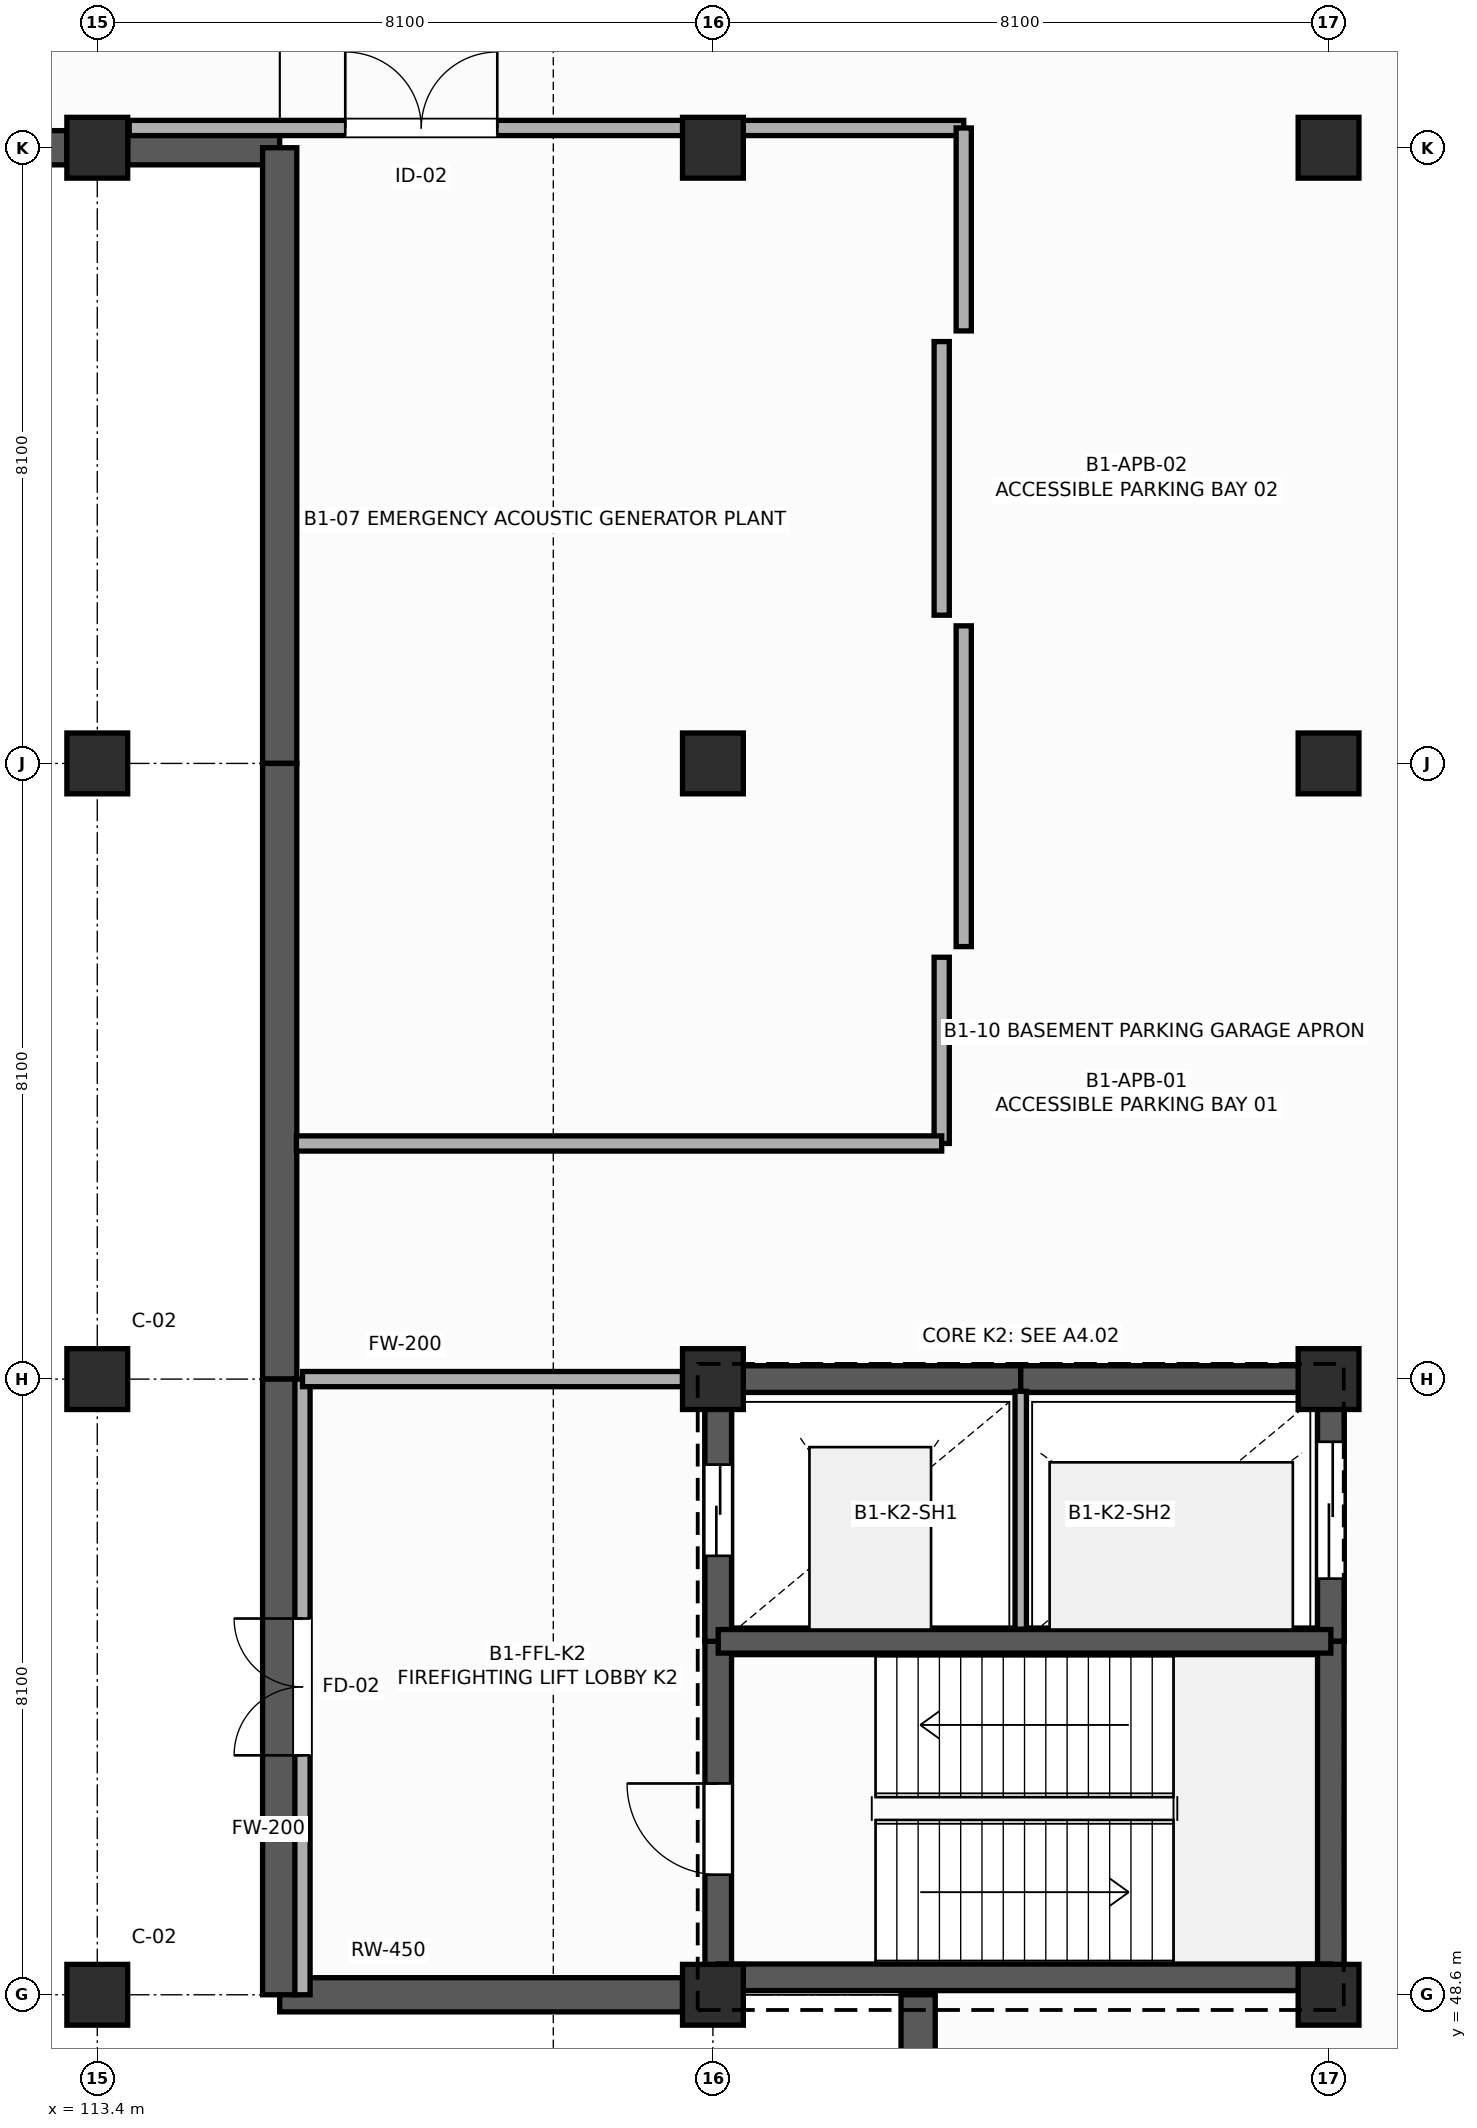
"""IFC4 building model, lengths in metres.
Left out: names, types, materials, properties, quantities, classifications, styles, units other than length and angle.
Written with IfcOpenShell. Run it as: python <this file> out.ifc"""

import sys

from ifc_helpers import new_model, si_unit, direction, frame, frame_2d, origin, origin_2d, place, context, subcontext, project, spatial, rectangle, extrude, element, fill, save


model = new_model("IFC4")
c1 = context("Model", 3, precision=1e-05, world=origin(), true_north=direction((0.0, 1.0)))
c2 = subcontext(c1, "Body", "Model", "MODEL_VIEW")
j1 = project(units=[si_unit("LENGTHUNIT", "METRE"), si_unit("PLANEANGLEUNIT", "RADIAN")], contexts=[c1])
p1 = place(None, origin())
s1 = spatial("IfcSite", under=j1, at=p1, CompositionType="ELEMENT")
p2 = place(p1, origin())
s2 = spatial("IfcBuilding", under=s1, at=p2, CompositionType="ELEMENT")
p3 = place(p2, frame((0.0, 0.0, -5.4)))
s3 = spatial("IfcBuildingStorey", under=s2, at=p3, CompositionType="ELEMENT", Elevation=-5.4)
for number, where, z_axis, x_axis in (
    (1, (113.4, 48.6, -0.4), (0.0, 0.0, 1.0), (1.0, 0.0, 0.0)),
    (2, (113.4, 56.7, -0.4), (0.0, 0.0, 1.0), (1.0, 0.0, 0.0)),
    (3, (113.4, 64.8, -0.4), (0.0, 0.0, 1.0), (1.0, 0.0, 0.0)),
    (4, (113.4, 72.9, -0.4), (0.0, 0.0, 1.0), (1.0, 0.0, 0.0)),
    (5, (121.5, 48.6, -0.4), (0.0, 0.0, 1.0), (1.0, 0.0, 0.0)),
    (6, (121.5, 56.7, -0.4), (0.0, 0.0, 1.0), (1.0, 0.0, 0.0)),
    (7, (121.5, 64.8, -0.4), (0.0, 0.0, 1.0), (1.0, 0.0, 0.0)),
    (8, (121.5, 72.9, -0.4), (0.0, 0.0, 1.0), (1.0, 0.0, 0.0)),
    (9, (129.6, 48.6, -0.4), (0.0, 0.0, 1.0), (1.0, 0.0, 0.0)),
    (10, (129.6, 56.7, -0.4), (0.0, 0.0, 1.0), (1.0, 0.0, 0.0)),
    (11, (129.6, 64.8, -0.4), (0.0, 0.0, 1.0), (1.0, 0.0, 0.0)),
    (12, (129.6, 72.9, -0.4), (0.0, 0.0, 1.0), (1.0, 0.0, 0.0)),
):
    element("IfcColumn", number, at=place(p3, frame(where, z_axis=z_axis, x_axis=x_axis)), inside=s3, PredefinedType="COLUMN", context=c2, shape_type="SweptSolid", body=[
        extrude(rectangle(XDim=0.8, YDim=0.8, at=origin_2d()), origin(), (0.0, 0.0, 1.0), 5.8),
    ])
p4 = place(p3, frame((115.8, 48.6, 0.0), z_axis=(0.0, 0.0, 1.0), x_axis=(1.0, 0.0, 0.0)))
e13 = element("IfcWall", 13, at=p4, inside=s3, PredefinedType="USERDEFINED", context=c2, shape_type="SweptSolid", body=[
    extrude(rectangle(XDim=5.3, YDim=0.45, at=frame_2d((2.65, 0.0))), origin(), (0.0, 0.0, 1.0), 5.1),
])
p5 = place(p3, frame((124.2, 48.6, 0.0), z_axis=(0.0, 0.0, 1.0), x_axis=(0.0, -1.0, 0.0)))
e14 = element("IfcWall", 14, at=p5, inside=s3, PredefinedType="USERDEFINED", context=c2, shape_type="SweptSolid", body=[
    extrude(rectangle(XDim=8.1, YDim=0.45, at=frame_2d((4.05, 0.0))), origin(), (0.0, 0.0, 1.0), 5.1),
])
p6 = place(p3, frame((105.7, 72.9, 0.0), z_axis=(0.0, 0.0, 1.0), x_axis=(1.0, 0.0, 0.0)))
e15 = element("IfcWall", 15, at=p6, inside=s3, PredefinedType="USERDEFINED", context=c2, shape_type="SweptSolid", body=[
    extrude(rectangle(XDim=7.3, YDim=0.45, at=frame_2d((3.65, 0.0))), origin(), (0.0, 0.0, 1.0), 5.1),
])
p7 = place(p3, frame((113.8, 72.9, 0.0), z_axis=(0.0, 0.0, 1.0), x_axis=(1.0, 0.0, 0.0)))
e16 = element("IfcWall", 16, at=p7, inside=s3, PredefinedType="USERDEFINED", context=c2, shape_type="SweptSolid", body=[
    extrude(rectangle(XDim=2.0, YDim=0.45, at=frame_2d((1.0, 0.0))), origin(), (0.0, 0.0, 1.0), 5.1),
])
p8 = place(p3, frame((115.8, 72.9, 0.0), z_axis=(0.0, 0.0, 1.0), x_axis=(0.0, -1.0, 0.0)))
e17 = element("IfcWall", 17, at=p8, inside=s3, PredefinedType="USERDEFINED", context=c2, shape_type="SweptSolid", body=[
    extrude(rectangle(XDim=8.1, YDim=0.45, at=frame_2d((4.05, 0.0))), origin(), (0.0, 0.0, 1.0), 5.1),
])
p9 = place(p3, frame((115.8, 64.8, 0.0), z_axis=(0.0, 0.0, 1.0), x_axis=(0.0, -1.0, 0.0)))
e18 = element("IfcWall", 18, at=p9, inside=s3, PredefinedType="USERDEFINED", context=c2, shape_type="SweptSolid", body=[
    extrude(rectangle(XDim=8.1, YDim=0.45, at=frame_2d((4.05, 0.0))), origin(), (0.0, 0.0, 1.0), 5.1),
])
p10 = place(p3, frame((115.8, 56.7, 0.0), z_axis=(0.0, 0.0, 1.0), x_axis=(0.0, -1.0, 0.0)))
e19 = element("IfcWall", 19, at=p10, inside=s3, PredefinedType="USERDEFINED", context=c2, shape_type="SweptSolid", body=[
    extrude(rectangle(XDim=8.1, YDim=0.45, at=frame_2d((4.05, 0.0))), origin(), (0.0, 0.0, 1.0), 5.1),
])
p11 = place(p3, frame((121.57, 53.25, -1.35), z_axis=(0.0, 0.0, 1.0), x_axis=(1.0, 0.0, 0.0)))
e20 = element("IfcWall", 20, at=p11, inside=s3, PredefinedType="SHEAR", context=c2, shape_type="SweptSolid", body=[
    extrude(rectangle(XDim=8.06, YDim=0.35, at=frame_2d((4.03, 0.0))), origin(), (0.0, 0.0, 1.0), 0.95),
])
p12 = place(p3, frame((129.63, 53.25, -1.35), z_axis=(0.0, 0.0, 1.0), x_axis=(0.0, 1.0, 0.0)))
e21 = element("IfcWall", 21, at=p12, inside=s3, PredefinedType="SHEAR", context=c2, shape_type="SweptSolid", body=[
    extrude(rectangle(XDim=3.45, YDim=0.35, at=frame_2d((1.725, 0.0))), origin(), (0.0, 0.0, 1.0), 0.95),
])
p13 = place(p3, frame((129.63, 56.7, -1.35), z_axis=(0.0, 0.0, 1.0), x_axis=(-1.0, 0.0, 0.0)))
e22 = element("IfcWall", 22, at=p13, inside=s3, PredefinedType="SHEAR", context=c2, shape_type="SweptSolid", body=[
    extrude(rectangle(XDim=8.06, YDim=0.35, at=frame_2d((4.03, 0.0))), origin(), (0.0, 0.0, 1.0), 0.95),
])
p14 = place(p3, frame((121.57, 56.7, -1.35), z_axis=(0.0, 0.0, 1.0), x_axis=(0.0, -1.0, 0.0)))
e23 = element("IfcWall", 23, at=p14, inside=s3, PredefinedType="SHEAR", context=c2, shape_type="SweptSolid", body=[
    extrude(rectangle(XDim=3.45, YDim=0.35, at=frame_2d((1.725, 0.0))), origin(), (0.0, 0.0, 1.0), 0.95),
])
p15 = place(p3, frame((121.57, 48.83, -0.4), z_axis=(0.0, 0.0, 1.0), x_axis=(0.0, 1.0, 0.0)))
e24 = element("IfcWall", 24, at=p15, inside=s3, PredefinedType="SHEAR", context=c2, shape_type="SweptSolid", body=[
    extrude(rectangle(XDim=4.42, YDim=0.35, at=frame_2d((2.21, 0.0))), origin(), (0.0, 0.0, 1.0), 5.8),
])
p16 = place(p15, frame((1.35, 0.0, 0.4)))
e25 = element("IfcOpeningElement", 25, at=p16, cuts=e24, PredefinedType="OPENING", context=c2, shape_type="SweptSolid", body=[
    extrude(rectangle(XDim=1.2, YDim=2.25, at=frame_2d((0.6, 1.125))), frame((0.0, 0.185, 0.0), z_axis=(0.0, -1.0, 0.0), x_axis=(1.0, 0.0, 0.0)), (0.0, 0.0, 1.0), 0.37),
])
p17 = place(p3, frame((121.57, 53.25, -0.4), z_axis=(0.0, 0.0, 1.0), x_axis=(0.0, 1.0, 0.0)))
e26 = element("IfcWall", 26, at=p17, inside=s3, PredefinedType="SHEAR", context=c2, shape_type="SweptSolid", body=[
    extrude(rectangle(XDim=3.45, YDim=0.35, at=frame_2d((1.725, 0.0))), origin(), (0.0, 0.0, 1.0), 5.8),
])
p18 = place(p17, frame((1.125, 0.0, 0.4)))
e27 = element("IfcOpeningElement", 27, at=p18, cuts=e26, PredefinedType="OPENING", context=c2, shape_type="SweptSolid", body=[
    extrude(rectangle(XDim=1.2, YDim=2.2, at=frame_2d((0.6, 1.1))), frame((0.0, 0.185, 0.0), z_axis=(0.0, -1.0, 0.0), x_axis=(1.0, 0.0, 0.0)), (0.0, 0.0, 1.0), 0.37),
])
p19 = place(p3, frame((121.57, 56.7, -0.4), z_axis=(0.0, 0.0, 1.0), x_axis=(1.0, 0.0, 0.0)))
e28 = element("IfcWall", 28, at=p19, inside=s3, PredefinedType="SHEAR", context=c2, shape_type="SweptSolid", body=[
    extrude(rectangle(XDim=3.98, YDim=0.35, at=frame_2d((1.99, 0.0))), origin(), (0.0, 0.0, 1.0), 5.8),
])
p20 = place(p3, frame((125.55, 56.7, -0.4), z_axis=(0.0, 0.0, 1.0), x_axis=(1.0, 0.0, 0.0)))
e29 = element("IfcWall", 29, at=p20, inside=s3, PredefinedType="SHEAR", context=c2, shape_type="SweptSolid", body=[
    extrude(rectangle(XDim=4.08, YDim=0.35, at=frame_2d((2.04, 0.0))), origin(), (0.0, 0.0, 1.0), 5.8),
])
p21 = place(p3, frame((129.63, 56.7, -0.4), z_axis=(0.0, 0.0, 1.0), x_axis=(0.0, -1.0, 0.0)))
e30 = element("IfcWall", 30, at=p21, inside=s3, PredefinedType="SHEAR", context=c2, shape_type="SweptSolid", body=[
    extrude(rectangle(XDim=3.45, YDim=0.35, at=frame_2d((1.725, 0.0))), origin(), (0.0, 0.0, 1.0), 5.8),
])
p22 = place(p21, frame((0.825, 0.0, 0.4)))
e31 = element("IfcOpeningElement", 31, at=p22, cuts=e30, PredefinedType="OPENING", context=c2, shape_type="SweptSolid", body=[
    extrude(rectangle(XDim=1.8, YDim=2.4, at=frame_2d((0.9, 1.2))), frame((0.0, 0.185, 0.0), z_axis=(0.0, -1.0, 0.0), x_axis=(1.0, 0.0, 0.0)), (0.0, 0.0, 1.0), 0.37),
])
p23 = place(p3, frame((129.63, 53.25, -0.4), z_axis=(0.0, 0.0, 1.0), x_axis=(0.0, -1.0, 0.0)))
e32 = element("IfcWall", 32, at=p23, inside=s3, PredefinedType="SHEAR", context=c2, shape_type="SweptSolid", body=[
    extrude(rectangle(XDim=4.42, YDim=0.35, at=frame_2d((2.21, 0.0))), origin(), (0.0, 0.0, 1.0), 5.8),
])
p24 = place(p3, frame((129.63, 48.83, -0.4), z_axis=(0.0, 0.0, 1.0), x_axis=(-1.0, 0.0, 0.0)))
e33 = element("IfcWall", 33, at=p24, inside=s3, PredefinedType="SHEAR", context=c2, shape_type="SweptSolid", body=[
    extrude(rectangle(XDim=8.06, YDim=0.35, at=frame_2d((4.03, 0.0))), origin(), (0.0, 0.0, 1.0), 5.8),
])
p25 = place(p3, frame((121.57, 53.25, -0.4), z_axis=(0.0, 0.0, 1.0), x_axis=(1.0, 0.0, 0.0)))
e34 = element("IfcWall", 34, at=p25, inside=s3, PredefinedType="SHEAR", context=c2, shape_type="SweptSolid", body=[
    extrude(rectangle(XDim=8.06, YDim=0.31, at=frame_2d((4.03, 0.0))), origin(), (0.0, 0.0, 1.0), 5.8),
])
p26 = place(p3, frame((125.55, 53.41, 0.0), z_axis=(0.0, 0.0, 1.0), x_axis=(0.0, 1.0, 0.0)))
e35 = element("IfcWall", 35, at=p26, inside=s3, PredefinedType="PLUMBINGWALL", context=c2, shape_type="SweptSolid", body=[
    extrude(rectangle(XDim=3.13, YDim=0.15, at=frame_2d((1.565, 0.0))), origin(), (0.0, 0.0, 1.0), 5.05),
])
p27 = place(p3, frame((116.1, 48.6, 0.0), z_axis=(0.0, 0.0, 1.0), x_axis=(0.0, 1.0, 0.0)))
e36 = element("IfcWall", 36, at=p27, inside=s3, PredefinedType="PARTITIONING", context=c2, shape_type="SweptSolid", body=[
    extrude(rectangle(XDim=8.1, YDim=0.2, at=frame_2d((4.05, 0.0))), origin(), (0.0, 0.0, 1.0), 5.1),
])
p28 = place(p27, frame((3.15, 0.0, 0.0)))
e37 = element("IfcOpeningElement", 37, at=p28, cuts=e36, PredefinedType="OPENING", context=c2, shape_type="SweptSolid", body=[
    extrude(rectangle(XDim=1.8, YDim=2.25, at=frame_2d((0.9, 1.125))), frame((0.0, 0.11, 0.0), z_axis=(0.0, -1.0, 0.0), x_axis=(1.0, 0.0, 0.0)), (0.0, 0.0, 1.0), 0.22),
])
p29 = place(p3, frame((116.1, 56.7, 0.0), z_axis=(0.0, 0.0, 1.0), x_axis=(1.0, 0.0, 0.0)))
e38 = element("IfcWall", 38, at=p29, inside=s3, PredefinedType="PARTITIONING", context=c2, shape_type="SweptSolid", body=[
    extrude(rectangle(XDim=5.0, YDim=0.2, at=frame_2d((2.5, 0.0))), origin(), (0.0, 0.0, 1.0), 4.446),
])
p30 = place(p3, frame((124.51, 70.35, 0.0), z_axis=(0.0, 0.0, 1.0), x_axis=(0.0, -1.0, 0.0)))
e39 = element("IfcWall", 39, at=p30, inside=s3, PredefinedType="PARTITIONING", context=c2, shape_type="SweptSolid", body=[
    extrude(rectangle(XDim=3.6, YDim=0.2, at=frame_2d((1.8, 0.0))), origin(), (0.0, 0.0, 1.0), 5.12),
])
p31 = place(p3, frame((124.8, 66.61, 0.0), z_axis=(0.0, 0.0, 1.0), x_axis=(0.0, -1.0, 0.0)))
e40 = element("IfcWall", 40, at=p31, inside=s3, PredefinedType="PARTITIONING", context=c2, shape_type="SweptSolid", body=[
    extrude(rectangle(XDim=4.22, YDim=0.2, at=frame_2d((2.11, 0.0))), origin(), (0.0, 0.0, 1.0), 5.12),
])
p32 = place(p3, frame((124.51, 62.25, 0.0), z_axis=(0.0, 0.0, 1.0), x_axis=(0.0, -1.0, 0.0)))
e41 = element("IfcWall", 41, at=p32, inside=s3, PredefinedType="PARTITIONING", context=c2, shape_type="SweptSolid", body=[
    extrude(rectangle(XDim=2.45, YDim=0.2, at=frame_2d((1.225, 0.0))), origin(), (0.0, 0.0, 1.0), 5.12),
])
p33 = place(p3, frame((124.51, 59.8, 0.0), z_axis=(0.0, 0.0, 1.0), x_axis=(-1.0, 0.0, 0.0)))
e42 = element("IfcWall", 42, at=p33, inside=s3, PredefinedType="PARTITIONING", context=c2, shape_type="SweptSolid", body=[
    extrude(rectangle(XDim=8.49, YDim=0.2, at=frame_2d((4.245, 0.0))), origin(), (0.0, 0.0, 1.0), 5.12),
])
p34 = place(p3, frame((113.82, 73.16, 0.0), z_axis=(0.0, 0.0, 1.0), x_axis=(1.0, 0.0, 0.0)))
e43 = element("IfcWall", 43, at=p34, inside=s3, PredefinedType="PARTITIONING", context=c2, shape_type="SweptSolid", body=[
    extrude(rectangle(XDim=10.98, YDim=0.2, at=frame_2d((5.49, 0.0))), origin(), (0.0, 0.0, 1.0), 4.254),
])
p35 = place(p34, frame((2.843, 0.0, 0.0)))
e44 = element("IfcOpeningElement", 44, at=p35, cuts=e43, PredefinedType="OPENING", context=c2, shape_type="SweptSolid", body=[
    extrude(rectangle(XDim=2.0, YDim=2.5, at=frame_2d((1.0, 1.25))), frame((0.0, 0.11, 0.0), z_axis=(0.0, -1.0, 0.0), x_axis=(1.0, 0.0, 0.0)), (0.0, 0.0, 1.0), 0.22),
])
p36 = place(p3, frame((124.8, 73.16, 0.0), z_axis=(0.0, 0.0, 1.0), x_axis=(0.0, -1.0, 0.0)))
e45 = element("IfcWall", 45, at=p36, inside=s3, PredefinedType="PARTITIONING", context=c2, shape_type="SweptSolid", body=[
    extrude(rectangle(XDim=2.67, YDim=0.2, at=frame_2d((1.335, 0.0))), origin(), (0.0, 0.0, 1.0), 5.12),
])
p37 = place(p16, origin())
e46 = element("IfcDoor", 46, at=p37, inside=s3, OperationType="SINGLE_SWING_RIGHT", PredefinedType="DOOR", context=c2, shape_type="SweptSolid", body=[
    extrude(rectangle(XDim=1.2, YDim=2.25, at=frame_2d((0.6, 1.125))), frame((0.0, 0.025, 0.0), z_axis=(0.0, -1.0, 0.0), x_axis=(1.0, 0.0, 0.0)), (0.0, 0.0, 1.0), 0.05),
])
fill(e25, e46)
p38 = place(p18, origin())
e47 = element("IfcDoor", 47, at=p38, inside=s3, OperationType="SLIDING_TO_LEFT", PredefinedType="DOOR", context=c2, shape_type="SweptSolid", body=[
    extrude(rectangle(XDim=1.2, YDim=2.2, at=frame_2d((0.6, 1.1))), frame((0.0, 0.025, 0.0), z_axis=(0.0, -1.0, 0.0), x_axis=(1.0, 0.0, 0.0)), (0.0, 0.0, 1.0), 0.05),
])
fill(e27, e47)
p39 = place(p22, origin())
e48 = element("IfcDoor", 48, at=p39, inside=s3, OperationType="SLIDING_TO_LEFT", PredefinedType="DOOR", context=c2, shape_type="SweptSolid", body=[
    extrude(rectangle(XDim=1.8, YDim=2.4, at=frame_2d((0.9, 1.2))), frame((0.0, 0.025, 0.0), z_axis=(0.0, -1.0, 0.0), x_axis=(1.0, 0.0, 0.0)), (0.0, 0.0, 1.0), 0.05),
])
fill(e31, e48)
p40 = place(p28, origin())
e49 = element("IfcDoor", 49, at=p40, inside=s3, OperationType="DOUBLE_DOOR_SINGLE_SWING", PredefinedType="DOOR", context=c2, shape_type="SweptSolid", body=[
    extrude(rectangle(XDim=1.8, YDim=2.25, at=frame_2d((0.9, 1.125))), frame((0.0, 0.025, 0.0), z_axis=(0.0, -1.0, 0.0), x_axis=(1.0, 0.0, 0.0)), (0.0, 0.0, 1.0), 0.05),
])
fill(e37, e49)
p41 = place(p35, origin())
e50 = element("IfcDoor", 50, at=p41, inside=s3, OperationType="DOUBLE_DOOR_SINGLE_SWING", PredefinedType="DOOR", context=c2, shape_type="SweptSolid", body=[
    extrude(rectangle(XDim=2.0, YDim=2.5, at=frame_2d((1.0, 1.25))), frame((0.0, 0.025, 0.0), z_axis=(0.0, -1.0, 0.0), x_axis=(1.0, 0.0, 0.0)), (0.0, 0.0, 1.0), 0.05),
])
fill(e44, e50)
save(model, sys.argv[1])
